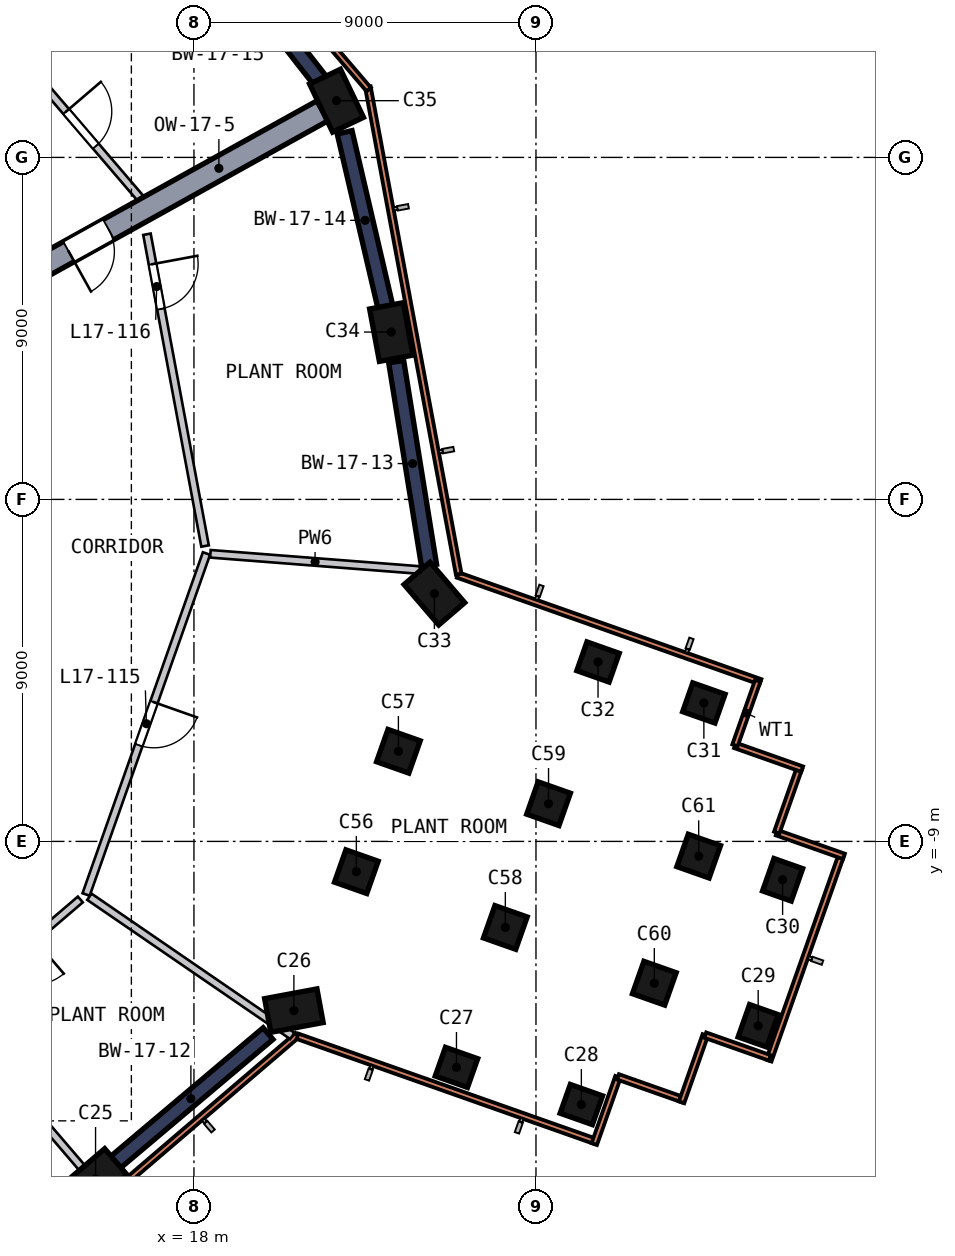
"""IFC4 building model, lengths in metres.
Left out: names, types, materials, properties, quantities, classifications, styles, units other than length and angle.
Written with IfcOpenShell. Run it as: python <this file> out.ifc"""

import sys

from ifc_helpers import new_model, si_unit, direction, frame, frame_2d, origin, origin_2d, place, context, subcontext, project, spatial, rectangle, extrude, element, fill, save


model = new_model("IFC4")
c1 = context("Model", 3, precision=1e-05, world=origin(), true_north=direction((0.0, 1.0)))
c2 = subcontext(c1, "Body", "Model", "MODEL_VIEW")
j1 = project(units=[si_unit("LENGTHUNIT", "METRE"), si_unit("PLANEANGLEUNIT", "RADIAN")], contexts=[c1])
p1 = place(None, origin())
s1 = spatial("IfcSite", under=j1, at=p1, CompositionType="ELEMENT")
p2 = place(p1, origin())
s2 = spatial("IfcBuilding", under=s1, at=p2, CompositionType="ELEMENT")
p3 = place(p2, frame((0.0, 0.0, 75.0)))
s3 = spatial("IfcBuildingStorey", under=s2, at=p3, CompositionType="ELEMENT", Elevation=75.0)
p4 = place(p3, frame((15.351, -17.936, 0.0), z_axis=(0.049588704, 0.043146504, 0.997837331), x_axis=(0.758262845, 0.64862709, -0.065729414)))
e1 = element("IfcColumn", 1, at=p4, inside=s3, PredefinedType="COLUMN", context=c2, shape_type="SweptSolid", body=[
    extrude(rectangle(XDim=1.4, YDim=0.9, at=origin_2d()), origin(), (0.0, 0.0, 1.0), 4.51),
])
p5 = place(p3, frame((20.585, -13.522, 0.0), z_axis=(0.037130289, 0.057643962, 0.997646488), x_axis=(-0.982298041, -0.18132342, 0.04703591)))
e2 = element("IfcColumn", 2, at=p5, inside=s3, PredefinedType="COLUMN", context=c2, shape_type="SweptSolid", body=[
    extrude(rectangle(XDim=1.4, YDim=0.9, at=origin_2d()), origin(), (0.0, 0.0, 1.0), 4.51),
])
p6 = place(p3, frame((24.858, -15.03, 0.0), z_axis=(0.041260003, 0.069487685, 0.996729188), x_axis=(0.942328981, -0.334319575, -0.015700757)))
e3 = element("IfcColumn", 3, at=p6, inside=s3, PredefinedType="COLUMN", context=c2, shape_type="SweptSolid", body=[
    extrude(rectangle(XDim=0.9, YDim=0.8, at=origin_2d()), origin(), (0.0, 0.0, 1.0), 4.515),
])
p7 = place(p3, frame((28.141, -16.019, 0.0), z_axis=(0.04387491, 0.078618219, 0.995938837), x_axis=(0.942464815, -0.333961598, -0.015156646)))
e4 = element("IfcColumn", 4, at=p7, inside=s3, PredefinedType="COLUMN", context=c2, shape_type="SweptSolid", body=[
    extrude(rectangle(XDim=0.9, YDim=0.8, at=origin_2d()), origin(), (0.0, 0.0, 1.0), 4.518),
])
p8 = place(p3, frame((32.801, -13.963, 0.0), z_axis=(0.038060581, 0.091453368, 0.995081742), x_axis=(0.330961386, 0.938446557, -0.098907131)))
e5 = element("IfcColumn", 5, at=p8, inside=s3, PredefinedType="COLUMN", context=c2, shape_type="SweptSolid", body=[
    extrude(rectangle(XDim=0.9, YDim=0.8, at=origin_2d()), origin(), (0.0, 0.0, 1.0), 4.522),
])
p9 = place(p3, frame((33.457, -10.122, 0.0), z_axis=(0.027322478, 0.093198808, 0.995272558), x_axis=(0.331508097, 0.938454828, -0.096978957)))
e6 = element("IfcColumn", 6, at=p9, inside=s3, PredefinedType="COLUMN", context=c2, shape_type="SweptSolid", body=[
    extrude(rectangle(XDim=0.9, YDim=0.8, at=origin_2d()), origin(), (0.0, 0.0, 1.0), 4.521),
])
p10 = place(p3, frame((31.4, -5.462, 0.0), z_axis=(0.014482645, 0.087490304, 0.996060088), x_axis=(-0.943261566, 0.331692405, -0.0154197)))
e7 = element("IfcColumn", 7, at=p10, inside=s3, PredefinedType="COLUMN", context=c2, shape_type="SweptSolid", body=[
    extrude(rectangle(XDim=0.9, YDim=0.8, at=origin_2d()), origin(), (0.0, 0.0, 1.0), 4.518),
])
p11 = place(p3, frame((28.619, -4.374, 0.0), z_axis=(0.011518451, 0.079709841, 0.996751557), x_axis=(-0.943215452, 0.331813429, -0.015635205)))
e8 = element("IfcColumn", 8, at=p11, inside=s3, PredefinedType="COLUMN", context=c2, shape_type="SweptSolid", body=[
    extrude(rectangle(XDim=0.9, YDim=0.8, at=origin_2d()), origin(), (0.0, 0.0, 1.0), 4.515),
])
p12 = place(p3, frame((24.319, -2.56, 0.0), z_axis=(0.006603539, 0.06782159, 0.997675611), x_axis=(0.650855376, -0.757732941, 0.047202421)))
e9 = element("IfcColumn", 9, at=p12, inside=s3, PredefinedType="COLUMN", context=c2, shape_type="SweptSolid", body=[
    extrude(rectangle(XDim=1.4, YDim=0.9, at=origin_2d()), origin(), (0.0, 0.0, 1.0), 4.51),
])
p13 = place(p3, frame((23.208, 4.327, 0.0), z_axis=(-0.01261366, 0.064584105, 0.997832546), x_axis=(-0.18302285, 0.980904037, -0.06580202)))
e10 = element("IfcColumn", 10, at=p13, inside=s3, PredefinedType="COLUMN", context=c2, shape_type="SweptSolid", body=[
    extrude(rectangle(XDim=1.4, YDim=0.9, at=origin_2d()), origin(), (0.0, 0.0, 1.0), 4.51),
])
p14 = place(p3, frame((21.788, 10.42, 0.0), z_axis=(-0.029555234, 0.06046373, 0.997732743), x_axis=(0.430597628, -0.900031459, 0.067298255)))
e11 = element("IfcColumn", 11, at=p14, inside=s3, PredefinedType="COLUMN", context=c2, shape_type="SweptSolid", body=[
    extrude(rectangle(XDim=1.4, YDim=0.9, at=origin_2d()), origin(), (0.0, 0.0, 1.0), 4.51),
])
for number, where, z_axis, x_axis in (
    (12, (22.241, -9.871, 0.0), (0.027, 0.062, 0.998), (0.943, -0.333, -0.005)),
    (13, (23.358, -6.706, 0.0), (0.018, 0.065, 0.998), (0.943, -0.332, 0.005)),
):
    element("IfcColumn", number, at=place(p3, frame(where, z_axis=z_axis, x_axis=x_axis)), inside=s3, PredefinedType="COLUMN", context=c2, shape_type="SweptSolid", body=[
        extrude(rectangle(XDim=0.9, YDim=0.9, at=origin_2d()), origin(), (0.0, 0.0, 1.0), 4.51),
    ])
for number, where, z_axis, x_axis in (
    (14, (26.156, -11.352, 0.0), (0.031, 0.073, 0.997), (0.943, -0.333, -0.005)),
    (15, (27.304, -8.099, 0.0), (0.022, 0.076, 0.997), (0.943, -0.333, 0.005)),
):
    element("IfcColumn", number, at=place(p3, frame(where, z_axis=z_axis, x_axis=x_axis)), inside=s3, PredefinedType="COLUMN", context=c2, shape_type="SweptSolid", body=[
        extrude(rectangle(XDim=0.9, YDim=0.9, at=origin_2d()), origin(), (0.0, 0.0, 1.0), 4.514),
    ])
p15 = place(p3, frame((30.072, -12.833, 0.0), z_axis=(0.035010646, 0.083906688, 0.995858385), x_axis=(0.942715693, -0.3335592, -0.005038104)))
e16 = element("IfcColumn", 16, at=p15, inside=s3, PredefinedType="COLUMN", context=c2, shape_type="SweptSolid", body=[
    extrude(rectangle(XDim=0.9, YDim=0.9, at=origin_2d()), origin(), (0.0, 0.0, 1.0), 4.519),
])
p16 = place(p3, frame((31.251, -9.492, 0.0), z_axis=(0.025663951, 0.087095345, 0.99586935), x_axis=(0.943107052, -0.332454998, 0.004771138)))
e17 = element("IfcColumn", 17, at=p16, inside=s3, PredefinedType="COLUMN", context=c2, shape_type="SweptSolid", body=[
    extrude(rectangle(XDim=0.9, YDim=0.9, at=origin_2d()), origin(), (0.0, 0.0, 1.0), 4.519),
])
p17 = place(p3, frame((15.889, -17.482, 0.0), z_axis=(0.0, 0.0, 1.0), x_axis=(0.764448601, 0.64468468, 0.0)))
e18 = element("IfcWall", 18, at=p17, inside=s3, PredefinedType="SHEAR", context=c2, shape_type="SweptSolid", body=[
    extrude(rectangle(XDim=5.312, YDim=0.4, at=frame_2d((2.656, 0.0))), origin(), (0.0, 0.0, 1.0), 4.5),
])
p18 = place(p3, frame((24.187, -1.739, 0.0), z_axis=(0.0, 0.0, 1.0), x_axis=(-0.159259283, 0.987236791, 0.0)))
e19 = element("IfcWall", 19, at=p18, inside=s3, PredefinedType="SHEAR", context=c2, shape_type="SweptSolid", body=[
    extrude(rectangle(XDim=5.433, YDim=0.4, at=frame_2d((2.716, 0.0))), origin(), (0.0, 0.0, 1.0), 4.5),
])
p19 = place(p3, frame((23.045, 5.027, 0.0), z_axis=(0.0, 0.0, 1.0), x_axis=(-0.227085229, 0.973874889, 0.0)))
e20 = element("IfcWall", 20, at=p19, inside=s3, PredefinedType="SHEAR", context=c2, shape_type="SweptSolid", body=[
    extrude(rectangle(XDim=4.757, YDim=0.4, at=frame_2d((2.379, 0.0))), origin(), (0.0, 0.0, 1.0), 4.5),
])
p20 = place(p3, frame((21.307, 11.035, 0.0), z_axis=(0.0, 0.0, 1.0), x_axis=(-0.615609183, 0.788051606, 0.0)))
e21 = element("IfcWall", 21, at=p20, inside=s3, PredefinedType="SHEAR", context=c2, shape_type="SweptSolid", body=[
    extrude(rectangle(XDim=4.757, YDim=0.4, at=frame_2d((2.378, 0.0))), origin(), (0.0, 0.0, 1.0), 4.5),
])
p21 = place(p3, frame((13.614, 5.913, 0.0), z_axis=(0.0, 0.0, 1.0), x_axis=(0.874286861, 0.485409605, 0.0)))
e22 = element("IfcWall", 22, at=p21, inside=s3, PredefinedType="SHEAR", context=c2, shape_type="SweptSolid", body=[
    extrude(rectangle(XDim=8.885, YDim=0.6, at=frame_2d((4.442, 0.0))), origin(), (0.0, 0.0, 1.0), 4.5),
])
p22 = place(p21, frame((1.25, 0.0, 0.0)))
e23 = element("IfcOpeningElement", 23, at=p22, cuts=e22, PredefinedType="OPENING", context=c2, shape_type="SweptSolid", body=[
    extrude(rectangle(XDim=1.2, YDim=2.1, at=frame_2d((0.6, 1.05))), frame((0.0, 0.31, 0.0), z_axis=(0.0, -1.0, 0.0), x_axis=(1.0, 0.0, 0.0)), (0.0, 0.0, 1.0), 0.62),
])
p23 = place(p3, frame((10.787, -22.599, 0.0), z_axis=(0.0, 0.0, 1.0), x_axis=(0.759722997, 0.650246851, 0.0)))
e24 = element("IfcWall", 24, at=p23, inside=s3, PredefinedType="SOLIDWALL", context=c2, shape_type="SweptSolid", body=[
    extrude(rectangle(XDim=13.075, YDim=0.15, at=frame_2d((6.538, 0.0))), origin(), (0.0, 0.0, 1.0), 4.5),
])
p24 = place(p3, frame((20.726, -14.128, 0.0), z_axis=(0.0, 0.0, 1.0), x_axis=(0.942988163, -0.332826267, 0.0)))
e25 = element("IfcWall", 25, at=p24, inside=s3, PredefinedType="SOLIDWALL", context=c2, shape_type="SweptSolid", body=[
    extrude(rectangle(XDim=8.307, YDim=0.15, at=frame_2d((4.153, 0.0))), origin(), (0.0, 0.0, 1.0), 4.5),
])
p25 = place(p3, frame((28.534, -16.964, 0.0), z_axis=(0.0, 0.0, 1.0), x_axis=(0.332820118, 0.942990334, 0.0)))
e26 = element("IfcWall", 26, at=p25, inside=s3, PredefinedType="SOLIDWALL", context=c2, shape_type="SweptSolid", body=[
    extrude(rectangle(XDim=1.875, YDim=0.15, at=frame_2d((0.938, 0.0))), origin(), (0.0, 0.0, 1.0), 4.5),
])
p26 = place(p3, frame((29.158, -15.196, 0.0), z_axis=(0.0, 0.0, 1.0), x_axis=(0.943017877, -0.332742067, 0.0)))
e27 = element("IfcWall", 27, at=p26, inside=s3, PredefinedType="SOLIDWALL", context=c2, shape_type="SweptSolid", body=[
    extrude(rectangle(XDim=1.8, YDim=0.15, at=frame_2d((0.9, 0.0))), origin(), (0.0, 0.0, 1.0), 4.5),
])
p27 = place(p3, frame((30.831, -15.865, 0.0), z_axis=(0.0, 0.0, 1.0), x_axis=(0.332820118, 0.942990334, 0.0)))
e28 = element("IfcWall", 28, at=p27, inside=s3, PredefinedType="SOLIDWALL", context=c2, shape_type="SweptSolid", body=[
    extrude(rectangle(XDim=1.875, YDim=0.15, at=frame_2d((0.938, 0.0))), origin(), (0.0, 0.0, 1.0), 4.5),
])
p28 = place(p3, frame((31.455, -14.097, 0.0), z_axis=(0.0, 0.0, 1.0), x_axis=(0.942975308, -0.332862688, 0.0)))
e29 = element("IfcWall", 29, at=p28, inside=s3, PredefinedType="SOLIDWALL", context=c2, shape_type="SweptSolid", body=[
    extrude(rectangle(XDim=1.8, YDim=0.15, at=frame_2d((0.9, 0.0))), origin(), (0.0, 0.0, 1.0), 4.5),
])
p29 = place(p3, frame((33.127, -14.767, 0.0), z_axis=(0.0, 0.0, 1.0), x_axis=(0.332849117, 0.942980098, 0.0)))
e30 = element("IfcWall", 30, at=p29, inside=s3, PredefinedType="SOLIDWALL", context=c2, shape_type="SweptSolid", body=[
    extrude(rectangle(XDim=5.725, YDim=0.15, at=frame_2d((2.862, 0.0))), origin(), (0.0, 0.0, 1.0), 4.5),
])
p30 = place(p3, frame((35.103, -9.394, 0.0), z_axis=(0.0, 0.0, 1.0), x_axis=(-0.942990334, 0.332820118, 0.0)))
e31 = element("IfcWall", 31, at=p30, inside=s3, PredefinedType="SOLIDWALL", context=c2, shape_type="SweptSolid", body=[
    extrude(rectangle(XDim=1.875, YDim=0.15, at=frame_2d((0.938, 0.0))), origin(), (0.0, 0.0, 1.0), 4.5),
])
p31 = place(p3, frame((33.335, -8.77, 0.0), z_axis=(0.0, 0.0, 1.0), x_axis=(0.332820118, 0.942990334, 0.0)))
e32 = element("IfcWall", 32, at=p31, inside=s3, PredefinedType="SOLIDWALL", context=c2, shape_type="SweptSolid", body=[
    extrude(rectangle(XDim=1.8, YDim=0.15, at=frame_2d((0.9, 0.0))), origin(), (0.0, 0.0, 1.0), 4.5),
])
p32 = place(p3, frame((34.005, -7.097, 0.0), z_axis=(0.0, 0.0, 1.0), x_axis=(-0.943004754, 0.332779256, 0.0)))
e33 = element("IfcWall", 33, at=p32, inside=s3, PredefinedType="SOLIDWALL", context=c2, shape_type="SweptSolid", body=[
    extrude(rectangle(XDim=1.875, YDim=0.15, at=frame_2d((0.938, 0.0))), origin(), (0.0, 0.0, 1.0), 4.5),
])
p33 = place(p3, frame((32.237, -6.473, 0.0), z_axis=(0.0, 0.0, 1.0), x_axis=(0.332820118, 0.942990334, 0.0)))
e34 = element("IfcWall", 34, at=p33, inside=s3, PredefinedType="SOLIDWALL", context=c2, shape_type="SweptSolid", body=[
    extrude(rectangle(XDim=1.8, YDim=0.15, at=frame_2d((0.9, 0.0))), origin(), (0.0, 0.0, 1.0), 4.5),
])
p34 = place(p3, frame((32.906, -4.801, 0.0), z_axis=(0.0, 0.0, 1.0), x_axis=(-0.942992468, 0.332814069, 0.0)))
e35 = element("IfcWall", 35, at=p34, inside=s3, PredefinedType="SOLIDWALL", context=c2, shape_type="SweptSolid", body=[
    extrude(rectangle(XDim=8.445, YDim=0.15, at=frame_2d((4.222, 0.0))), origin(), (0.0, 0.0, 1.0), 4.5),
])
p35 = place(p3, frame((24.967, -1.969, 0.0), z_axis=(0.0, 0.0, 1.0), x_axis=(-0.183259133, 0.983064642, 0.0)))
e36 = element("IfcWall", 36, at=p35, inside=s3, PredefinedType="SOLIDWALL", context=c2, shape_type="SweptSolid", body=[
    extrude(rectangle(XDim=13.046, YDim=0.15, at=frame_2d((6.523, 0.0))), origin(), (0.0, 0.0, 1.0), 4.5),
])
p36 = place(p3, frame((22.599, 10.787, 0.0), z_axis=(0.0, 0.0, 1.0), x_axis=(-0.650246716, 0.759723113, 0.0)))
e37 = element("IfcWall", 37, at=p36, inside=s3, PredefinedType="SOLIDWALL", context=c2, shape_type="SweptSolid", body=[
    extrude(rectangle(XDim=13.035, YDim=0.15, at=frame_2d((6.518, 0.0))), origin(), (0.0, 0.0, 1.0), 4.5),
])
p37 = place(p3, frame((15.01, -10.528, 0.0), z_axis=(0.0, 0.0, 1.0), x_axis=(-0.759742775, -0.650223742, 0.0)))
e38 = element("IfcWall", 38, at=p37, inside=s3, PredefinedType="SOLIDWALL", context=c2, shape_type="SweptSolid", body=[
    extrude(rectangle(XDim=4.358, YDim=0.2, at=frame_2d((2.179, 0.0))), origin(), (0.0, 0.0, 1.0), 4.5),
])
p38 = place(p37, frame((1.6, 0.0, 0.0)))
e39 = element("IfcOpeningElement", 39, at=p38, cuts=e38, PredefinedType="OPENING", context=c2, shape_type="SweptSolid", body=[
    extrude(rectangle(XDim=1.2, YDim=2.1, at=frame_2d((0.6, 1.05))), frame((0.0, 0.11, 0.0), z_axis=(0.0, -1.0, 0.0), x_axis=(1.0, 0.0, 0.0)), (0.0, 0.0, 1.0), 0.22),
])
p39 = place(p3, frame((11.547, -13.491, 0.0), z_axis=(0.0, 0.0, 1.0), x_axis=(0.650233927, -0.759734059, 0.0)))
e40 = element("IfcWall", 40, at=p39, inside=s3, PredefinedType="SOLIDWALL", context=c2, shape_type="SweptSolid", body=[
    extrude(rectangle(XDim=6.35, YDim=0.2, at=frame_2d((3.175, 0.0))), origin(), (0.0, 0.0, 1.0), 4.5),
])
p40 = place(p3, frame((10.801, 14.69, 0.0), z_axis=(0.0, 0.0, 1.0), x_axis=(0.650257786, -0.759713638, 0.0)))
e41 = element("IfcWall", 41, at=p40, inside=s3, PredefinedType="SOLIDWALL", context=c2, shape_type="SweptSolid", body=[
    extrude(rectangle(XDim=8.895, YDim=0.2, at=frame_2d((4.448, 0.0))), origin(), (0.0, 0.0, 1.0), 4.5),
])
p41 = place(p40, frame((5.9, 0.0, 0.0)))
e42 = element("IfcOpeningElement", 42, at=p41, cuts=e41, PredefinedType="OPENING", context=c2, shape_type="SweptSolid", body=[
    extrude(rectangle(XDim=1.2, YDim=2.1, at=frame_2d((0.6, 1.05))), frame((0.0, 0.11, 0.0), z_axis=(0.0, -1.0, 0.0), x_axis=(1.0, 0.0, 0.0)), (0.0, 0.0, 1.0), 0.22),
])
p42 = place(p3, frame((18.33, -1.423, 0.0), z_axis=(0.0, 0.0, 1.0), x_axis=(-0.332818776, -0.942990807, 0.0)))
e43 = element("IfcWall", 43, at=p42, inside=s3, PredefinedType="SOLIDWALL", context=c2, shape_type="SweptSolid", body=[
    extrude(rectangle(XDim=9.516, YDim=0.2, at=frame_2d((4.758, 0.0))), origin(), (0.0, 0.0, 1.0), 4.5),
])
p43 = place(p42, frame((4.15, 0.0, 0.0)))
e44 = element("IfcOpeningElement", 44, at=p43, cuts=e43, PredefinedType="OPENING", context=c2, shape_type="SweptSolid", body=[
    extrude(rectangle(XDim=1.2, YDim=2.1, at=frame_2d((0.6, 1.05))), frame((0.0, 0.11, 0.0), z_axis=(0.0, -1.0, 0.0), x_axis=(1.0, 0.0, 0.0)), (0.0, 0.0, 1.0), 0.22),
])
p44 = place(p3, frame((16.763, 6.978, 0.0), z_axis=(0.0, 0.0, 1.0), x_axis=(0.183272845, -0.983062086, 0.0)))
e45 = element("IfcWall", 45, at=p44, inside=s3, PredefinedType="SOLIDWALL", context=c2, shape_type="SweptSolid", body=[
    extrude(rectangle(XDim=8.346, YDim=0.2, at=frame_2d((4.173, 0.0))), origin(), (0.0, 0.0, 1.0), 4.5),
])
p45 = place(p44, frame((0.8, 0.0, 0.0)))
e46 = element("IfcOpeningElement", 46, at=p45, cuts=e45, PredefinedType="OPENING", context=c2, shape_type="SweptSolid", body=[
    extrude(rectangle(XDim=1.2, YDim=2.1, at=frame_2d((0.6, 1.05))), frame((0.0, 0.11, 0.0), z_axis=(0.0, -1.0, 0.0), x_axis=(1.0, 0.0, 0.0)), (0.0, 0.0, 1.0), 0.22),
])
p46 = place(p3, frame((15.248, -10.456, 0.0), z_axis=(0.0, 0.0, 1.0), x_axis=(0.824728852, -0.565528356, 0.0)))
e47 = element("IfcWall", 47, at=p46, inside=s3, PredefinedType="SOLIDWALL", context=c2, shape_type="SweptSolid", body=[
    extrude(rectangle(XDim=6.476, YDim=0.2, at=frame_2d((3.238, 0.0))), origin(), (0.0, 0.0, 1.0), 4.5),
])
p47 = place(p3, frame((18.433, -1.431, 0.0), z_axis=(0.0, 0.0, 1.0), x_axis=(0.9970028, -0.077365473, 0.0)))
e48 = element("IfcWall", 48, at=p47, inside=s3, PredefinedType="SOLIDWALL", context=c2, shape_type="SweptSolid", body=[
    extrude(rectangle(XDim=5.526, YDim=0.2, at=frame_2d((2.763, 0.0))), origin(), (0.0, 0.0, 1.0), 4.5),
])
p48 = place(p22, origin())
e49 = element("IfcDoor", 49, at=p48, inside=s3, OperationType="SINGLE_SWING_LEFT", PredefinedType="DOOR", context=c2, shape_type="SweptSolid", body=[
    extrude(rectangle(XDim=1.2, YDim=2.1, at=frame_2d((0.6, 1.05))), frame((0.0, 0.025, 0.0), z_axis=(0.0, -1.0, 0.0), x_axis=(1.0, 0.0, 0.0)), (0.0, 0.0, 1.0), 0.05),
])
fill(e23, e49)
p49 = place(p43, origin())
e50 = element("IfcDoor", 50, at=p49, inside=s3, OperationType="SINGLE_SWING_LEFT", PredefinedType="DOOR", context=c2, shape_type="SweptSolid", body=[
    extrude(rectangle(XDim=1.2, YDim=2.1, at=frame_2d((0.6, 1.05))), frame((0.0, 0.025, 0.0), z_axis=(0.0, -1.0, 0.0), x_axis=(1.0, 0.0, 0.0)), (0.0, 0.0, 1.0), 0.05),
])
fill(e44, e50)
p50 = place(p45, origin())
e51 = element("IfcDoor", 51, at=p50, inside=s3, OperationType="SINGLE_SWING_LEFT", PredefinedType="DOOR", context=c2, shape_type="SweptSolid", body=[
    extrude(rectangle(XDim=1.2, YDim=2.1, at=frame_2d((0.6, 1.05))), frame((0.0, 0.025, 0.0), z_axis=(0.0, -1.0, 0.0), x_axis=(1.0, 0.0, 0.0)), (0.0, 0.0, 1.0), 0.05),
])
fill(e46, e51)
p51 = place(p41, origin())
e52 = element("IfcDoor", 52, at=p51, inside=s3, OperationType="SINGLE_SWING_LEFT", PredefinedType="DOOR", context=c2, shape_type="SweptSolid", body=[
    extrude(rectangle(XDim=1.2, YDim=2.1, at=frame_2d((0.6, 1.05))), frame((0.0, 0.025, 0.0), z_axis=(0.0, -1.0, 0.0), x_axis=(1.0, 0.0, 0.0)), (0.0, 0.0, 1.0), 0.05),
])
fill(e42, e52)
save(model, sys.argv[1])
